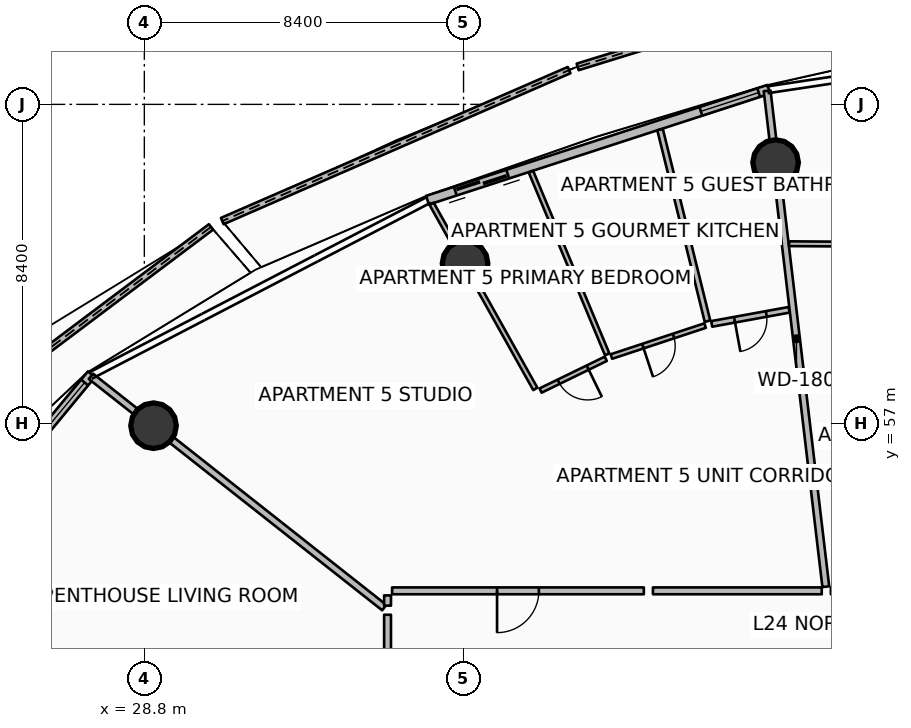
"""IFC4 building model, lengths in metres.
Left out: names, types, materials, properties, quantities, classifications, styles, units other than length and angle.
Written with IfcOpenShell. Run it as: python <this file> out.ifc"""

import sys

from ifc_helpers import new_model, si_unit, direction, frame, frame_2d, origin, origin_2d, place, context, subcontext, project, spatial, polyline, rectangle, circle, outline, extrude, element, fill, save


model = new_model("IFC4")
c1 = context("Model", 3, precision=1e-05, world=origin(), true_north=direction((0.0, 1.0)))
c2 = subcontext(c1, "Body", "Model", "MODEL_VIEW")
j1 = project(units=[si_unit("LENGTHUNIT", "METRE"), si_unit("PLANEANGLEUNIT", "RADIAN")], contexts=[c1])
p1 = place(None, origin())
s1 = spatial("IfcSite", under=j1, at=p1, CompositionType="ELEMENT")
p2 = place(p1, origin())
s2 = spatial("IfcBuilding", under=s1, at=p2, CompositionType="ELEMENT")
p3 = place(p2, frame((0.0, 0.0, 97.65)))
s3 = spatial("IfcBuildingStorey", under=s2, at=p3, CompositionType="ELEMENT", Elevation=97.65)
for number, where, z_axis, x_axis in (
    (1, (45.412, 63.869, 0.0), (0.0, 0.0, 1.0), (1.0, 0.0, 0.0)),
    (2, (37.24, 61.214, 0.0), (0.0, 0.0, 1.0), (1.0, 0.0, 0.0)),
    (3, (29.042, 56.945, 0.0), (0.0, 0.0, 1.0), (1.0, 0.0, 0.0)),
):
    element("IfcColumn", number, at=place(p3, frame(where, z_axis=z_axis, x_axis=x_axis)), inside=s3, PredefinedType="COLUMN", context=c2, shape_type="SweptSolid", body=[
        extrude(circle(Radius=0.6, at=origin_2d()), origin(), (0.0, 0.0, 1.0), 3.5),
    ])
p4 = place(p3, frame((49.989, 69.406, 0.0), z_axis=(0.0, 0.0, 1.0), x_axis=(-0.955530222606, -0.294893190301, 0.0)))
e4 = element("IfcWall", 4, at=p4, inside=s3, PredefinedType="PARAPET", context=c2, shape_type="SweptSolid", body=[
    extrude(outline(polyline([(0.0, 0.0), (10.241, 0.0), (10.241, 1.348), (5.121, 1.562), (0.0, 1.747), (0.0, 0.0)])), frame((0.0, 0.09, 0.0), z_axis=(0.0, -1.0, 0.0), x_axis=(1.0, 0.0, 0.0)), (0.0, 0.0, 1.0), 0.18),
])
p5 = place(p3, frame((39.978, 66.302, 0.0), z_axis=(0.0, 0.0, 1.0), x_axis=(-0.916910512906, -0.399092860527, 0.0)))
e5 = element("IfcWall", 5, at=p5, inside=s3, PredefinedType="PARAPET", context=c2, shape_type="SweptSolid", body=[
    extrude(outline(polyline([(0.0, 0.0), (9.955, 0.0), (9.955, 1.12), (4.977, 1.182), (0.0, 1.348), (0.0, 0.0)])), frame((0.0, 0.09, 0.0), z_axis=(0.0, -1.0, 0.0), x_axis=(1.0, 0.0, 0.0)), (0.0, 0.0, 1.0), 0.18),
])
p6 = place(p3, frame((30.554, 62.175, 0.0), z_axis=(0.0, 0.0, 1.0), x_axis=(-0.799377932659, -0.600828528598, 0.0)))
e6 = element("IfcWall", 6, at=p6, inside=s3, PredefinedType="PARAPET", context=c2, shape_type="SweptSolid", body=[
    extrude(outline(polyline([(0.0, 0.0), (11.075, 0.0), (11.075, 1.348), (5.538, 1.182), (0.0, 1.12), (0.0, 0.0)])), frame((0.0, 0.09, 0.0), z_axis=(0.0, -1.0, 0.0), x_axis=(1.0, 0.0, 0.0)), (0.0, 0.0, 1.0), 0.18),
])
p7 = place(p3, frame((45.233, 65.797, 0.0), z_axis=(0.0, 0.0, 1.0), x_axis=(-0.951052494852, -0.30902937083, 0.0)))
e7 = element("IfcWall", 7, at=p7, inside=s3, PredefinedType="SOLIDWALL", context=c2, shape_type="SweptSolid", body=[
    extrude(rectangle(XDim=9.444, YDim=0.24, at=frame_2d((4.722, 0.0))), origin(), (0.0, 0.0, 1.0), 2.45),
])
p8 = place(p7, frame((7.224, 0.0, 0.0)))
e8 = element("IfcOpeningElement", 8, at=p8, cuts=e7, PredefinedType="OPENING", context=c2, shape_type="SweptSolid", body=[
    extrude(rectangle(XDim=1.45, YDim=2.15, at=frame_2d((0.725, 1.075))), frame((0.0, 0.13, 0.0), z_axis=(0.0, -1.0, 0.0), x_axis=(1.0, 0.0, 0.0)), (0.0, 0.0, 1.0), 0.26),
])
p9 = place(p7, frame((0.28, 0.0, 0.65)))
e9 = element("IfcOpeningElement", 9, at=p9, cuts=e7, PredefinedType="OPENING", context=c2, shape_type="SweptSolid", body=[
    extrude(rectangle(XDim=1.6, YDim=1.5, at=frame_2d((0.8, 0.75))), frame((0.0, 0.13, 0.0), z_axis=(0.0, -1.0, 0.0), x_axis=(1.0, 0.0, 0.0)), (0.0, 0.0, 1.0), 0.26),
])
p10 = place(p3, frame((27.407, 58.298, 0.0), z_axis=(0.0, 0.0, 1.0), x_axis=(-0.636704975, -0.771107498868, 0.0)))
e10 = element("IfcWall", 10, at=p10, inside=s3, PredefinedType="SOLIDWALL", context=c2, shape_type="SweptSolid", body=[
    extrude(rectangle(XDim=11.084, YDim=0.24, at=frame_2d((5.542, 0.0))), origin(), (0.0, 0.0, 1.0), 2.45),
])
p11 = place(p10, frame((8.864, 0.0, 0.0)))
e11 = element("IfcOpeningElement", 11, at=p11, cuts=e10, PredefinedType="OPENING", context=c2, shape_type="SweptSolid", body=[
    extrude(rectangle(XDim=1.45, YDim=2.15, at=frame_2d((0.725, 1.075))), frame((0.0, 0.13, 0.0), z_axis=(0.0, -1.0, 0.0), x_axis=(1.0, 0.0, 0.0)), (0.0, 0.0, 1.0), 0.26),
])
p12 = place(p10, frame((0.28, 0.0, 0.65)))
e12 = element("IfcOpeningElement", 12, at=p12, cuts=e10, PredefinedType="OPENING", context=c2, shape_type="SweptSolid", body=[
    extrude(rectangle(XDim=1.6, YDim=1.5, at=frame_2d((0.8, 0.75))), frame((0.0, 0.13, 0.0), z_axis=(0.0, -1.0, 0.0), x_axis=(1.0, 0.0, 0.0)), (0.0, 0.0, 1.0), 0.26),
])
p13 = place(p3, frame((46.732, 52.709, 0.0), z_axis=(0.0, 0.0, 1.0), x_axis=(-0.117532311618, 0.993069058891, 0.0)))
e13 = element("IfcWall", 13, at=p13, inside=s3, PredefinedType="PARTITIONING", context=c2, shape_type="SweptSolid", body=[
    extrude(rectangle(XDim=13.138, YDim=0.18, at=frame_2d((6.569, 0.0))), origin(), (0.0, 0.0, 1.0), 2.94),
])
p14 = place(p3, frame((35.114, 52.159, 0.0), z_axis=(0.0, 0.0, 1.0), x_axis=(-0.785295873565, 0.619120659453, 0.0)))
e14 = element("IfcWall", 14, at=p14, inside=s3, PredefinedType="PARTITIONING", context=c2, shape_type="SweptSolid", body=[
    extrude(rectangle(XDim=9.829, YDim=0.18, at=frame_2d((4.915, 0.0))), origin(), (0.0, 0.0, 1.0), 2.94),
])
p15 = place(p3, frame((35.2, 51.971, 0.0), z_axis=(0.0, 0.0, 1.0), x_axis=(0.0, -1.0, 0.0)))
e15 = element("IfcWall", 15, at=p15, inside=s3, PredefinedType="PARTITIONING", context=c2, shape_type="SweptSolid", body=[
    extrude(rectangle(XDim=6.241, YDim=0.18, at=frame_2d((3.12, 0.0))), origin(), (0.0, 0.0, 1.0), 2.94),
])
p16 = place(p15, frame((2.57, 0.0, 0.0)))
e16 = element("IfcOpeningElement", 16, at=p16, cuts=e15, PredefinedType="OPENING", context=c2, shape_type="SweptSolid", body=[
    extrude(rectangle(XDim=1.1, YDim=2.1, at=frame_2d((0.55, 1.05))), frame((0.0, 0.1, 0.0), z_axis=(0.0, -1.0, 0.0), x_axis=(1.0, 0.0, 0.0)), (0.0, 0.0, 1.0), 0.2),
])
p17 = place(p3, frame((50.869, 52.6, 0.0), z_axis=(0.0, 0.0, 1.0), x_axis=(-1.0, 0.0, 0.0)))
e17 = element("IfcWall", 17, at=p17, inside=s3, PredefinedType="PARTITIONING", context=c2, shape_type="SweptSolid", body=[
    extrude(rectangle(XDim=4.004, YDim=0.18, at=frame_2d((2.002, 0.0))), origin(), (0.0, 0.0, 1.0), 2.94),
])
p18 = place(p3, frame((50.509, 61.702, 0.0), z_axis=(0.0, 0.0, 1.0), x_axis=(-0.999977627334, 0.006689157742, 0.0)))
e18 = element("IfcWall", 18, at=p18, inside=s3, PredefinedType="PARTITIONING", context=c2, shape_type="SweptSolid", body=[
    extrude(rectangle(XDim=4.745, YDim=0.125, at=frame_2d((2.372, 0.0))), origin(), (0.0, 0.0, 1.0), 2.94),
])
p19 = place(p18, frame((1.922, 0.0, 0.0)))
e19 = element("IfcOpeningElement", 19, at=p19, cuts=e18, PredefinedType="OPENING", context=c2, shape_type="SweptSolid", body=[
    extrude(rectangle(XDim=0.9, YDim=2.08, at=frame_2d((0.45, 1.04))), frame((0.0, 0.073, 0.0), z_axis=(0.0, -1.0, 0.0), x_axis=(1.0, 0.0, 0.0)), (0.0, 0.0, 1.0), 0.145),
])
p20 = place(p3, frame((41.944, 52.6, 0.0), z_axis=(0.0, 0.0, 1.0), x_axis=(-1.0, 0.0, 0.0)))
e20 = element("IfcWall", 20, at=p20, inside=s3, PredefinedType="PARTITIONING", context=c2, shape_type="SweptSolid", body=[
    extrude(rectangle(XDim=6.624, YDim=0.18, at=frame_2d((3.312, 0.0))), origin(), (0.0, 0.0, 1.0), 2.94),
])
p21 = place(p20, frame((2.762, 0.0, 0.0)))
e21 = element("IfcOpeningElement", 21, at=p21, cuts=e20, PredefinedType="OPENING", context=c2, shape_type="SweptSolid", body=[
    extrude(rectangle(XDim=1.1, YDim=2.1, at=frame_2d((0.55, 1.05))), frame((0.0, 0.1, 0.0), z_axis=(0.0, -1.0, 0.0), x_axis=(1.0, 0.0, 0.0)), (0.0, 0.0, 1.0), 0.2),
])
p22 = place(p3, frame((35.2, 52.48, 0.0), z_axis=(0.0, 0.0, 1.0), x_axis=(0.0, -1.0, 0.0)))
e22 = element("IfcWall", 22, at=p22, inside=s3, PredefinedType="PARTITIONING", context=c2, shape_type="SweptSolid", body=[
    extrude(rectangle(XDim=0.269, YDim=0.18, at=frame_2d((0.135, 0.0))), origin(), (0.0, 0.0, 1.0), 2.94),
])
p23 = place(p3, frame((46.625, 52.6, 0.0), z_axis=(0.0, 0.0, 1.0), x_axis=(-1.0, 0.0, 0.0)))
e23 = element("IfcWall", 23, at=p23, inside=s3, PredefinedType="PARTITIONING", context=c2, shape_type="SweptSolid", body=[
    extrude(rectangle(XDim=4.442, YDim=0.18, at=frame_2d((2.221, 0.0))), origin(), (0.0, 0.0, 1.0), 2.94),
])
p24 = place(p3, frame((39.088, 57.913, 0.0), z_axis=(0.0, 0.0, 1.0), x_axis=(-0.488595379978, 0.872510489716, 0.0)))
e24 = element("IfcWall", 24, at=p24, inside=s3, PredefinedType="PARTITIONING", context=c2, shape_type="SweptSolid", body=[
    extrude(rectangle(XDim=5.583, YDim=0.125, at=frame_2d((2.792, 0.0))), origin(), (0.0, 0.0, 1.0), 2.94),
])
p25 = place(p3, frame((45.77, 59.995, 0.0), z_axis=(0.0, 0.0, 1.0), x_axis=(-0.983792584323, -0.179310208943, 0.0)))
e25 = element("IfcWall", 25, at=p25, inside=s3, PredefinedType="PARTITIONING", context=c2, shape_type="SweptSolid", body=[
    extrude(rectangle(XDim=2.074, YDim=0.15, at=frame_2d((1.037, 0.0))), origin(), (0.0, 0.0, 1.0), 2.94),
])
p26 = place(p25, frame((0.612, 0.0, 0.0)))
e26 = element("IfcOpeningElement", 26, at=p26, cuts=e25, PredefinedType="OPENING", context=c2, shape_type="SweptSolid", body=[
    extrude(rectangle(XDim=0.85, YDim=2.06, at=frame_2d((0.425, 1.03))), frame((0.0, 0.085, 0.0), z_axis=(0.0, -1.0, 0.0), x_axis=(1.0, 0.0, 0.0)), (0.0, 0.0, 1.0), 0.17),
])
p27 = place(p3, frame((43.619, 59.695, 0.0), z_axis=(0.0, 0.0, 1.0), x_axis=(-0.240311723112, 0.970695768887, 0.0)))
e27 = element("IfcWall", 27, at=p27, inside=s3, PredefinedType="PARTITIONING", context=c2, shape_type="SweptSolid", body=[
    extrude(rectangle(XDim=5.193, YDim=0.15, at=frame_2d((2.597, 0.0))), origin(), (0.0, 0.0, 1.0), 2.94),
])
p28 = place(p3, frame((40.979, 58.823, 0.0), z_axis=(0.0, 0.0, 1.0), x_axis=(-0.385130983934, 0.92286192099, 0.0)))
e28 = element("IfcWall", 28, at=p28, inside=s3, PredefinedType="PARTITIONING", context=c2, shape_type="SweptSolid", body=[
    extrude(rectangle(XDim=5.211, YDim=0.125, at=frame_2d((2.605, 0.0))), origin(), (0.0, 0.0, 1.0), 2.94),
])
p29 = place(p3, frame((43.555, 59.579, 0.0), z_axis=(0.0, 0.0, 1.0), x_axis=(-0.949554185533, -0.313603011364, 0.0)))
e29 = element("IfcWall", 29, at=p29, inside=s3, PredefinedType="PARTITIONING", context=c2, shape_type="SweptSolid", body=[
    extrude(rectangle(XDim=2.596, YDim=0.125, at=frame_2d((1.298, 0.0))), origin(), (0.0, 0.0, 1.0), 2.94),
])
p30 = place(p29, frame((0.873, 0.0, 0.0)))
e30 = element("IfcOpeningElement", 30, at=p30, cuts=e29, PredefinedType="OPENING", context=c2, shape_type="SweptSolid", body=[
    extrude(rectangle(XDim=0.85, YDim=2.06, at=frame_2d((0.425, 1.03))), frame((0.0, 0.073, 0.0), z_axis=(0.0, -1.0, 0.0), x_axis=(1.0, 0.0, 0.0)), (0.0, 0.0, 1.0), 0.145),
])
p31 = place(p3, frame((40.942, 58.705, 0.0), z_axis=(0.0, 0.0, 1.0), x_axis=(-0.899211958503, -0.437513261153, 0.0)))
e31 = element("IfcWall", 31, at=p31, inside=s3, PredefinedType="PARTITIONING", context=c2, shape_type="SweptSolid", body=[
    extrude(rectangle(XDim=1.908, YDim=0.125, at=frame_2d((0.954, 0.0))), origin(), (0.0, 0.0, 1.0), 2.94),
])
p32 = place(p31, frame((0.529, 0.0, 0.0)))
e32 = element("IfcOpeningElement", 32, at=p32, cuts=e31, PredefinedType="OPENING", context=c2, shape_type="SweptSolid", body=[
    extrude(rectangle(XDim=0.85, YDim=2.06, at=frame_2d((0.425, 1.03))), frame((0.0, 0.073, 0.0), z_axis=(0.0, -1.0, 0.0), x_axis=(1.0, 0.0, 0.0)), (0.0, 0.0, 1.0), 0.145),
])
p33 = place(p8, origin())
e33 = element("IfcDoor", 33, at=p33, inside=s3, OperationType="DOUBLE_DOOR_SLIDING", PredefinedType="DOOR", context=c2, shape_type="SweptSolid", body=[
    extrude(rectangle(XDim=1.45, YDim=2.15, at=frame_2d((0.725, 1.075))), frame((0.0, 0.025, 0.0), z_axis=(0.0, -1.0, 0.0), x_axis=(1.0, 0.0, 0.0)), (0.0, 0.0, 1.0), 0.05),
])
fill(e8, e33)
p34 = place(p9, origin())
e34 = element("IfcWindow", 34, at=p34, inside=s3, PartitioningType="SINGLE_PANEL", PredefinedType="WINDOW", context=c2, shape_type="SweptSolid", body=[
    extrude(rectangle(XDim=1.6, YDim=1.5, at=frame_2d((0.8, 0.75))), frame((0.0, 0.03, 0.0), z_axis=(0.0, -1.0, 0.0), x_axis=(1.0, 0.0, 0.0)), (0.0, 0.0, 1.0), 0.06),
])
fill(e9, e34)
p35 = place(p12, origin())
e35 = element("IfcWindow", 35, at=p35, inside=s3, PartitioningType="SINGLE_PANEL", PredefinedType="WINDOW", context=c2, shape_type="SweptSolid", body=[
    extrude(rectangle(XDim=1.6, YDim=1.5, at=frame_2d((0.8, 0.75))), frame((0.0, 0.03, 0.0), z_axis=(0.0, -1.0, 0.0), x_axis=(1.0, 0.0, 0.0)), (0.0, 0.0, 1.0), 0.06),
])
fill(e12, e35)
p36 = place(p21, origin())
e36 = element("IfcDoor", 36, at=p36, inside=s3, OperationType="SINGLE_SWING_RIGHT", PredefinedType="DOOR", context=c2, shape_type="SweptSolid", body=[
    extrude(rectangle(XDim=1.1, YDim=2.1, at=frame_2d((0.55, 1.05))), frame((0.0, 0.025, 0.0), z_axis=(0.0, -1.0, 0.0), x_axis=(1.0, 0.0, 0.0)), (0.0, 0.0, 1.0), 0.05),
])
fill(e21, e36)
p37 = place(p26, origin())
e37 = element("IfcDoor", 37, at=p37, inside=s3, OperationType="SINGLE_SWING_RIGHT", PredefinedType="DOOR", context=c2, shape_type="SweptSolid", body=[
    extrude(rectangle(XDim=0.85, YDim=2.06, at=frame_2d((0.425, 1.03))), frame((0.0, 0.025, 0.0), z_axis=(0.0, -1.0, 0.0), x_axis=(1.0, 0.0, 0.0)), (0.0, 0.0, 1.0), 0.05),
])
fill(e26, e37)
p38 = place(p30, origin())
e38 = element("IfcDoor", 38, at=p38, inside=s3, OperationType="SINGLE_SWING_RIGHT", PredefinedType="DOOR", context=c2, shape_type="SweptSolid", body=[
    extrude(rectangle(XDim=0.85, YDim=2.06, at=frame_2d((0.425, 1.03))), frame((0.0, 0.025, 0.0), z_axis=(0.0, -1.0, 0.0), x_axis=(1.0, 0.0, 0.0)), (0.0, 0.0, 1.0), 0.05),
])
fill(e30, e38)
p39 = place(p32, origin())
e39 = element("IfcDoor", 39, at=p39, inside=s3, OperationType="SINGLE_SWING_LEFT", PredefinedType="DOOR", context=c2, shape_type="SweptSolid", body=[
    extrude(rectangle(XDim=0.85, YDim=2.06, at=frame_2d((0.425, 1.03))), frame((0.0, 0.025, 0.0), z_axis=(0.0, -1.0, 0.0), x_axis=(1.0, 0.0, 0.0)), (0.0, 0.0, 1.0), 0.05),
])
fill(e32, e39)
save(model, sys.argv[1])
